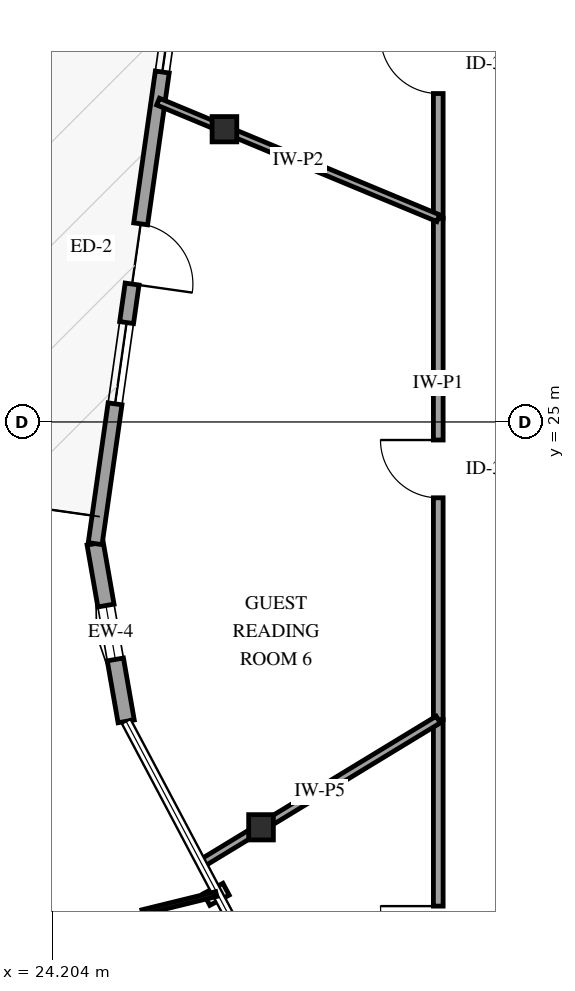
"""IFC4 building model, lengths in metres.
Left out: names, types, materials, properties, quantities, classifications, styles, units other than length and angle.
Written with IfcOpenShell. Run it as: python <this file> out.ifc"""

import sys

from ifc_helpers import new_model, si_unit, direction, frame, frame_2d, origin, origin_2d, place, context, subcontext, project, spatial, rectangle, i_section, extrude, element, fill, save


model = new_model("IFC4")
c1 = context("Model", 3, precision=1e-05, world=origin(), true_north=direction((0.0, 1.0)))
c2 = subcontext(c1, "Body", "Model", "MODEL_VIEW")
j1 = project(units=[si_unit("LENGTHUNIT", "METRE"), si_unit("PLANEANGLEUNIT", "RADIAN")], contexts=[c1])
p1 = place(None, origin())
s1 = spatial("IfcSite", under=j1, at=p1, CompositionType="ELEMENT")
p2 = place(p1, origin())
s2 = spatial("IfcBuilding", under=s1, at=p2, CompositionType="ELEMENT")
p3 = place(p2, frame((0.0, 0.0, 201.4)))
s3 = spatial("IfcBuildingStorey", under=s2, at=p3, CompositionType="ELEMENT", Elevation=201.4)
for number, where, z_axis, x_axis in (
    (1, (27.034, 29.814, 0.0), (0.0, 0.0, 1.0), (1.0, 0.0, 0.0)),
    (2, (27.635, 18.334, 0.0), (0.0, 0.0, 1.0), (1.0, 0.0, 0.0)),
):
    element("IfcColumn", number, at=place(p3, frame(where, z_axis=z_axis, x_axis=x_axis)), inside=s3, PredefinedType="COLUMN", context=c2, shape_type="SweptSolid", body=[
        extrude(i_section(OverallWidth=0.406, OverallDepth=0.416, WebThickness=0.03, FlangeThickness=0.048, FilletRadius=0.038, at=origin_2d()), origin(), (0.0, 0.0, 1.0), 3.6),
    ])
p4 = place(p3, frame((24.908, 22.999, 0.0), z_axis=(0.0, 0.0, 1.0), x_axis=(0.171921159352, -0.985110712036, 0.0)))
e3 = element("IfcWall", 3, at=p4, inside=s3, PredefinedType="SOLIDWALL", context=c2, shape_type="SweptSolid", body=[
    extrude(rectangle(XDim=2.967, YDim=0.27, at=frame_2d((1.483, 0.0))), origin(), (0.0, 0.0, 1.0), 2.679),
])
p5 = place(p4, frame((1.033, 0.0, 0.75)))
e4 = element("IfcOpeningElement", 4, at=p5, cuts=e3, PredefinedType="OPENING", context=c2, shape_type="SweptSolid", body=[
    extrude(rectangle(XDim=0.9, YDim=1.5, at=frame_2d((0.45, 0.75))), frame((0.0, 0.145, 0.0), z_axis=(0.0, -1.0, 0.0), x_axis=(1.0, 0.0, 0.0)), (0.0, 0.0, 1.0), 0.29),
])
p6 = place(p3, frame((26.264, 32.527, 0.0), z_axis=(0.0, 0.0, 1.0), x_axis=(-0.14089216596, -0.990024947954, 0.0)))
e5 = element("IfcWall", 5, at=p6, inside=s3, PredefinedType="SOLIDWALL", context=c2, shape_type="SweptSolid", body=[
    extrude(rectangle(XDim=9.624, YDim=0.23, at=frame_2d((4.812, 0.0))), origin(), (0.0, 0.0, 1.0), 2.679),
])
p7 = place(p6, frame((4.312, 0.0, 0.0)))
e6 = element("IfcOpeningElement", 6, at=p7, cuts=e5, PredefinedType="OPENING", context=c2, shape_type="SweptSolid", body=[
    extrude(rectangle(XDim=1.0, YDim=2.15, at=frame_2d((0.5, 1.075))), frame((0.0, 0.125, 0.0), z_axis=(0.0, -1.0, 0.0), x_axis=(1.0, 0.0, 0.0)), (0.0, 0.0, 1.0), 0.25),
])
p8 = place(p6, frame((0.44, 0.0, 0.72)))
e7 = element("IfcOpeningElement", 7, at=p8, cuts=e5, PredefinedType="OPENING", context=c2, shape_type="SweptSolid", body=[
    extrude(rectangle(XDim=1.35, YDim=1.65, at=frame_2d((0.675, 0.825))), frame((0.0, 0.125, 0.0), z_axis=(0.0, -1.0, 0.0), x_axis=(1.0, 0.0, 0.0)), (0.0, 0.0, 1.0), 0.25),
])
p9 = place(p6, frame((5.952, 0.0, 0.72)))
e8 = element("IfcOpeningElement", 8, at=p9, cuts=e5, PredefinedType="OPENING", context=c2, shape_type="SweptSolid", body=[
    extrude(rectangle(XDim=1.35, YDim=1.65, at=frame_2d((0.675, 0.825))), frame((0.0, 0.125, 0.0), z_axis=(0.0, -1.0, 0.0), x_axis=(1.0, 0.0, 0.0)), (0.0, 0.0, 1.0), 0.25),
])
p10 = place(p3, frame((30.55, 20.106, 0.0), z_axis=(0.0, 0.0, 1.0), x_axis=(0.0, 1.0, 0.0)))
e9 = element("IfcWall", 9, at=p10, inside=s3, PredefinedType="PARTITIONING", context=c2, shape_type="SweptSolid", body=[
    extrude(rectangle(XDim=8.245, YDim=0.16, at=frame_2d((4.123, 0.0))), origin(), (0.0, 0.0, 1.0), 3.3),
])
p11 = place(p10, frame((3.647, 0.0, 0.0)))
e10 = element("IfcOpeningElement", 10, at=p11, cuts=e9, PredefinedType="OPENING", context=c2, shape_type="SweptSolid", body=[
    extrude(rectangle(XDim=0.95, YDim=2.15, at=frame_2d((0.475, 1.075))), frame((0.0, 0.09, 0.0), z_axis=(0.0, -1.0, 0.0), x_axis=(1.0, 0.0, 0.0)), (0.0, 0.0, 1.0), 0.18),
])
p12 = place(p3, frame((30.55, 13.02, 0.0), z_axis=(0.0, 0.0, 1.0), x_axis=(0.0, 1.0, 0.0)))
e11 = element("IfcWall", 11, at=p12, inside=s3, PredefinedType="PARTITIONING", context=c2, shape_type="SweptSolid", body=[
    extrude(rectangle(XDim=7.086, YDim=0.16, at=frame_2d((3.543, 0.0))), origin(), (0.0, 0.0, 1.0), 3.3),
])
p13 = place(p12, frame((3.068, 0.0, 0.0)))
e12 = element("IfcOpeningElement", 12, at=p13, cuts=e11, PredefinedType="OPENING", context=c2, shape_type="SweptSolid", body=[
    extrude(rectangle(XDim=0.95, YDim=2.15, at=frame_2d((0.475, 1.075))), frame((0.0, 0.09, 0.0), z_axis=(0.0, -1.0, 0.0), x_axis=(1.0, 0.0, 0.0)), (0.0, 0.0, 1.0), 0.18),
])
p14 = place(p3, frame((30.55, 28.351, 0.0), z_axis=(0.0, 0.0, 1.0), x_axis=(0.0, 1.0, 0.0)))
e13 = element("IfcWall", 13, at=p14, inside=s3, PredefinedType="PARTITIONING", context=c2, shape_type="SweptSolid", body=[
    extrude(rectangle(XDim=5.05, YDim=0.16, at=frame_2d((2.525, 0.0))), origin(), (0.0, 0.0, 1.0), 3.3),
])
p15 = place(p14, frame((2.05, 0.0, 0.0)))
e14 = element("IfcOpeningElement", 14, at=p15, cuts=e13, PredefinedType="OPENING", context=c2, shape_type="SweptSolid", body=[
    extrude(rectangle(XDim=0.95, YDim=2.15, at=frame_2d((0.475, 1.075))), frame((0.0, 0.09, 0.0), z_axis=(0.0, -1.0, 0.0), x_axis=(1.0, 0.0, 0.0)), (0.0, 0.0, 1.0), 0.18),
])
p16 = place(p3, frame((30.55, 28.351, 0.0), z_axis=(0.0, 0.0, 1.0), x_axis=(-0.923295305511, 0.384090847093, 0.0)))
e15 = element("IfcWall", 15, at=p16, inside=s3, PredefinedType="PARTITIONING", context=c2, shape_type="SweptSolid", body=[
    extrude(rectangle(XDim=4.991, YDim=0.12, at=frame_2d((2.496, 0.0))), origin(), (0.0, 0.0, 1.0), 3.3),
])
p17 = place(p3, frame((30.55, 20.106, 0.0), z_axis=(0.0, 0.0, 1.0), x_axis=(-0.854582072733, -0.519316359229, 0.0)))
e16 = element("IfcWall", 16, at=p17, inside=s3, PredefinedType="PARTITIONING", context=c2, shape_type="SweptSolid", body=[
    extrude(rectangle(XDim=4.558, YDim=0.13, at=frame_2d((2.279, 0.0))), origin(), (0.0, 0.0, 1.0), 3.3),
])
p18 = place(p5, origin())
e17 = element("IfcWindow", 17, at=p18, inside=s3, PartitioningType="SINGLE_PANEL", PredefinedType="WINDOW", context=c2, shape_type="SweptSolid", body=[
    extrude(rectangle(XDim=0.9, YDim=1.5, at=frame_2d((0.45, 0.75))), frame((0.0, 0.03, 0.0), z_axis=(0.0, -1.0, 0.0), x_axis=(1.0, 0.0, 0.0)), (0.0, 0.0, 1.0), 0.06),
])
fill(e4, e17)
p19 = place(p7, origin())
e18 = element("IfcDoor", 18, at=p19, inside=s3, OperationType="SINGLE_SWING_RIGHT", PredefinedType="DOOR", context=c2, shape_type="SweptSolid", body=[
    extrude(rectangle(XDim=1.0, YDim=2.15, at=frame_2d((0.5, 1.075))), frame((0.0, 0.025, 0.0), z_axis=(0.0, -1.0, 0.0), x_axis=(1.0, 0.0, 0.0)), (0.0, 0.0, 1.0), 0.05),
])
fill(e6, e18)
p20 = place(p8, origin())
e19 = element("IfcWindow", 19, at=p20, inside=s3, PartitioningType="SINGLE_PANEL", PredefinedType="WINDOW", context=c2, shape_type="SweptSolid", body=[
    extrude(rectangle(XDim=1.35, YDim=1.65, at=frame_2d((0.675, 0.825))), frame((0.0, 0.03, 0.0), z_axis=(0.0, -1.0, 0.0), x_axis=(1.0, 0.0, 0.0)), (0.0, 0.0, 1.0), 0.06),
])
fill(e7, e19)
p21 = place(p9, origin())
e20 = element("IfcWindow", 20, at=p21, inside=s3, PartitioningType="SINGLE_PANEL", PredefinedType="WINDOW", context=c2, shape_type="SweptSolid", body=[
    extrude(rectangle(XDim=1.35, YDim=1.65, at=frame_2d((0.675, 0.825))), frame((0.0, 0.03, 0.0), z_axis=(0.0, -1.0, 0.0), x_axis=(1.0, 0.0, 0.0)), (0.0, 0.0, 1.0), 0.06),
])
fill(e8, e20)
p22 = place(p11, origin())
e21 = element("IfcDoor", 21, at=p22, inside=s3, OperationType="SINGLE_SWING_RIGHT", PredefinedType="DOOR", context=c2, shape_type="SweptSolid", body=[
    extrude(rectangle(XDim=0.95, YDim=2.15, at=frame_2d((0.475, 1.075))), frame((0.0, 0.025, 0.0), z_axis=(0.0, -1.0, 0.0), x_axis=(1.0, 0.0, 0.0)), (0.0, 0.0, 1.0), 0.05),
])
fill(e10, e21)
p23 = place(p13, origin())
e22 = element("IfcDoor", 22, at=p23, inside=s3, OperationType="SINGLE_SWING_RIGHT", PredefinedType="DOOR", context=c2, shape_type="SweptSolid", body=[
    extrude(rectangle(XDim=0.95, YDim=2.15, at=frame_2d((0.475, 1.075))), frame((0.0, 0.025, 0.0), z_axis=(0.0, -1.0, 0.0), x_axis=(1.0, 0.0, 0.0)), (0.0, 0.0, 1.0), 0.05),
])
fill(e12, e22)
p24 = place(p15, origin())
e23 = element("IfcDoor", 23, at=p24, inside=s3, OperationType="SINGLE_SWING_RIGHT", PredefinedType="DOOR", context=c2, shape_type="SweptSolid", body=[
    extrude(rectangle(XDim=0.95, YDim=2.15, at=frame_2d((0.475, 1.075))), frame((0.0, 0.025, 0.0), z_axis=(0.0, -1.0, 0.0), x_axis=(1.0, 0.0, 0.0)), (0.0, 0.0, 1.0), 0.05),
])
fill(e14, e23)
save(model, sys.argv[1])
